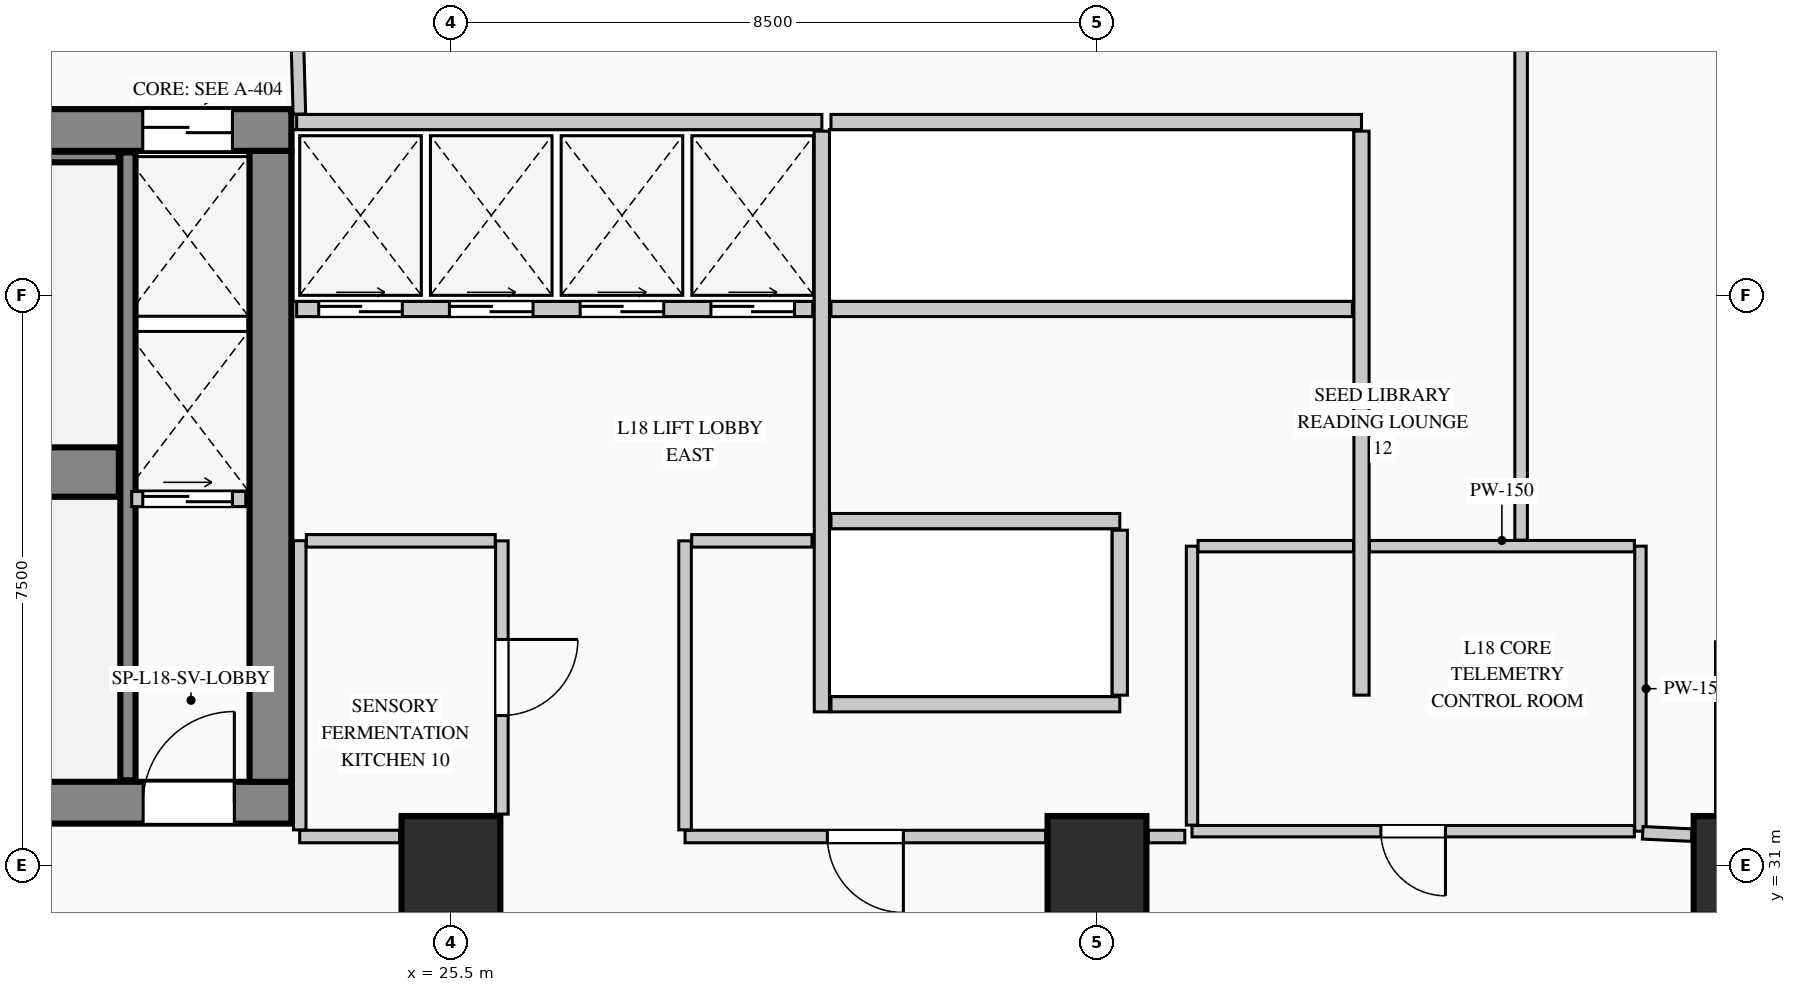
"""IFC4 building model, lengths in metres.
Left out: names, types, materials, properties, quantities, classifications, styles, units other than length and angle.
Written with IfcOpenShell. Run it as: python <this file> out.ifc"""

import sys

from ifc_helpers import new_model, si_unit, direction, frame, frame_2d, origin, origin_2d, place, context, subcontext, project, spatial, rectangle, extrude, element, fill, save


model = new_model("IFC4")
c1 = context("Model", 3, precision=1e-05, world=origin(), true_north=direction((0.0, 1.0)))
c2 = subcontext(c1, "Body", "Model", "MODEL_VIEW")
j1 = project(units=[si_unit("LENGTHUNIT", "METRE"), si_unit("PLANEANGLEUNIT", "RADIAN")], contexts=[c1])
p1 = place(None, origin())
s1 = spatial("IfcSite", under=j1, at=p1, CompositionType="ELEMENT")
p2 = place(p1, origin())
s2 = spatial("IfcBuilding", under=s1, at=p2, CompositionType="ELEMENT")
p3 = place(p2, frame((0.0, 0.0, 79.8)))
s3 = spatial("IfcBuildingStorey", under=s2, at=p3, CompositionType="ELEMENT", Elevation=79.8)
p4 = place(p3, frame((5.45, 40.675, 0.0), z_axis=(0.0, 0.0, 1.0), x_axis=(1.0, 0.0, 0.0)))
e1 = element("IfcWall", 1, at=p4, inside=s3, PredefinedType="SHEAR", context=c2, shape_type="SweptSolid", body=[
    extrude(rectangle(XDim=17.95, YDim=0.55, at=frame_2d((8.975, 0.0))), origin(), (0.0, 0.0, 1.0), 4.4),
])
p5 = place(p4, frame((15.995, 0.0, 0.0)))
e2 = element("IfcOpeningElement", 2, at=p5, cuts=e1, PredefinedType="OPENING", context=c2, shape_type="SweptSolid", body=[
    extrude(rectangle(XDim=1.18, YDim=2.25, at=frame_2d((0.59, 1.125))), frame((0.0, 0.285, 0.0), z_axis=(0.0, -1.0, 0.0), x_axis=(1.0, 0.0, 0.0)), (0.0, 0.0, 1.0), 0.57),
])
p6 = place(p3, frame((5.45, 31.825, 0.0), z_axis=(0.0, 0.0, 1.0), x_axis=(1.0, 0.0, 0.0)))
e3 = element("IfcWall", 3, at=p6, inside=s3, PredefinedType="SHEAR", context=c2, shape_type="SweptSolid", body=[
    extrude(rectangle(XDim=17.95, YDim=0.55, at=frame_2d((8.975, 0.0))), origin(), (0.0, 0.0, 1.0), 4.4),
])
p7 = place(p6, frame((3.2, 0.0, 0.0)))
e4 = element("IfcOpeningElement", 4, at=p7, cuts=e3, PredefinedType="OPENING", context=c2, shape_type="SweptSolid", body=[
    extrude(rectangle(XDim=1.2, YDim=2.2, at=frame_2d((0.6, 1.1))), frame((0.0, 0.285, 0.0), z_axis=(0.0, -1.0, 0.0), x_axis=(1.0, 0.0, 0.0)), (0.0, 0.0, 1.0), 0.57),
])
p8 = place(p6, frame((7.05, 0.0, 0.0)))
e5 = element("IfcOpeningElement", 5, at=p8, cuts=e3, PredefinedType="OPENING", context=c2, shape_type="SweptSolid", body=[
    extrude(rectangle(XDim=1.2, YDim=2.2, at=frame_2d((0.6, 1.1))), frame((0.0, 0.285, 0.0), z_axis=(0.0, -1.0, 0.0), x_axis=(1.0, 0.0, 0.0)), (0.0, 0.0, 1.0), 0.57),
])
p9 = place(p6, frame((8.9, 0.0, 0.0)))
e6 = element("IfcOpeningElement", 6, at=p9, cuts=e3, PredefinedType="OPENING", context=c2, shape_type="SweptSolid", body=[
    extrude(rectangle(XDim=1.15, YDim=2.2, at=frame_2d((0.575, 1.1))), frame((0.0, 0.285, 0.0), z_axis=(0.0, -1.0, 0.0), x_axis=(1.0, 0.0, 0.0)), (0.0, 0.0, 1.0), 0.57),
])
p10 = place(p6, frame((16.0, 0.0, 0.0)))
e7 = element("IfcOpeningElement", 7, at=p10, cuts=e3, PredefinedType="OPENING", context=c2, shape_type="SweptSolid", body=[
    extrude(rectangle(XDim=1.2, YDim=2.2, at=frame_2d((0.6, 1.1))), frame((0.0, 0.285, 0.0), z_axis=(0.0, -1.0, 0.0), x_axis=(1.0, 0.0, 0.0)), (0.0, 0.0, 1.0), 0.57),
])
p11 = place(p3, frame((23.125, 32.1, 0.0), z_axis=(0.0, 0.0, 1.0), x_axis=(0.0, 1.0, 0.0)))
e8 = element("IfcWall", 8, at=p11, inside=s3, PredefinedType="SHEAR", context=c2, shape_type="SweptSolid", body=[
    extrude(rectangle(XDim=8.3, YDim=0.55, at=frame_2d((4.15, 0.0))), origin(), (0.0, 0.0, 1.0), 4.4),
])
p12 = place(p3, frame((14.12, 36.175, 0.0), z_axis=(0.0, 0.0, 1.0), x_axis=(1.0, 0.0, 0.0)))
e9 = element("IfcWall", 9, at=p12, inside=s3, PredefinedType="SHEAR", context=c2, shape_type="SweptSolid", body=[
    extrude(rectangle(XDim=7.01, YDim=0.65, at=frame_2d((3.505, 0.0))), origin(), (0.0, 0.0, 1.0), 4.4),
])
p13 = place(p3, frame((21.25, 32.12, 0.0), z_axis=(0.0, 0.0, 1.0), x_axis=(0.0, 1.0, 0.0)))
e10 = element("IfcWall", 10, at=p13, inside=s3, PredefinedType="SHEAR", context=c2, shape_type="SweptSolid", body=[
    extrude(rectangle(XDim=8.26, YDim=0.2, at=frame_2d((4.13, 0.0))), origin(), (0.0, 0.0, 1.0), 4.4),
])
p14 = place(p3, frame((14.12, 40.32, 0.0), z_axis=(0.0, 0.0, 1.0), x_axis=(1.0, 0.0, 0.0)))
e11 = element("IfcWall", 11, at=p14, inside=s3, PredefinedType="SHEAR", context=c2, shape_type="SweptSolid", body=[
    extrude(rectangle(XDim=7.01, YDim=0.14, at=frame_2d((3.505, 0.0))), origin(), (0.0, 0.0, 1.0), 4.4),
])
for number, where, z_axis, x_axis in (
    (12, (25.5, 31.0, 0.0), (0.0, 0.0, 1.0), (1.0, 0.0, 0.0)),
    (13, (34.0, 31.0, 0.0), (0.0, 0.0, 1.0), (1.0, 0.0, 0.0)),
    (14, (42.5, 31.0, 0.0), (0.0, 0.0, 1.0), (1.0, 0.0, 0.0)),
):
    element("IfcColumn", number, at=place(p3, frame(where, z_axis=z_axis, x_axis=x_axis)), inside=s3, PredefinedType="COLUMN", context=c2, shape_type="SweptSolid", body=[
        extrude(rectangle(XDim=1.3, YDim=1.3, at=origin_2d()), origin(), (0.0, 0.0, 1.0), 4.4),
    ])
p15 = place(p3, frame((21.3, 35.82, 0.0), z_axis=(0.0, 0.0, 1.0), x_axis=(1.0, 0.0, 0.0)))
e15 = element("IfcWall", 15, at=p15, inside=s3, PredefinedType="PARTITIONING", context=c2, shape_type="SweptSolid", body=[
    extrude(rectangle(XDim=1.5, YDim=0.2, at=frame_2d((0.75, 0.0))), origin(), (0.0, 0.0, 1.0), 4.115),
])
p16 = place(p15, frame((0.145, 0.0, 0.0)))
e16 = element("IfcOpeningElement", 16, at=p16, cuts=e15, PredefinedType="OPENING", context=c2, shape_type="SweptSolid", body=[
    extrude(rectangle(XDim=1.18, YDim=2.25, at=frame_2d((0.59, 1.125))), frame((0.0, 0.11, 0.0), z_axis=(0.0, -1.0, 0.0), x_axis=(1.0, 0.0, 0.0)), (0.0, 0.0, 1.0), 0.22),
])
p17 = place(p3, frame((23.47, 40.78, 0.0), z_axis=(0.0, 0.0, 1.0), x_axis=(1.0, 0.0, 0.0)))
e17 = element("IfcWall", 17, at=p17, inside=s3, PredefinedType="PARTITIONING", context=c2, shape_type="SweptSolid", body=[
    extrude(rectangle(XDim=6.91, YDim=0.2, at=frame_2d((3.455, 0.0))), origin(), (0.0, 0.0, 1.0), 4.115),
])
p18 = place(p3, frame((30.38, 33.02, 0.0), z_axis=(0.0, 0.0, 1.0), x_axis=(0.0, 1.0, 0.0)))
e18 = element("IfcWall", 18, at=p18, inside=s3, PredefinedType="PARTITIONING", context=c2, shape_type="SweptSolid", body=[
    extrude(rectangle(XDim=7.64, YDim=0.2, at=frame_2d((3.82, 0.0))), origin(), (0.0, 0.0, 1.0), 4.115),
])
p19 = place(p3, frame((23.47, 38.32, 0.0), z_axis=(0.0, 0.0, 1.0), x_axis=(1.0, 0.0, 0.0)))
e19 = element("IfcWall", 19, at=p19, inside=s3, PredefinedType="PARTITIONING", context=c2, shape_type="SweptSolid", body=[
    extrude(rectangle(XDim=6.79, YDim=0.2, at=frame_2d((3.395, 0.0))), origin(), (0.0, 0.0, 1.0), 4.115),
])
p20 = place(p19, frame((0.29, 0.0, 0.0)))
e20 = element("IfcOpeningElement", 20, at=p20, cuts=e19, PredefinedType="OPENING", context=c2, shape_type="SweptSolid", body=[
    extrude(rectangle(XDim=1.1, YDim=2.2, at=frame_2d((0.55, 1.1))), frame((0.0, 0.11, 0.0), z_axis=(0.0, -1.0, 0.0), x_axis=(1.0, 0.0, 0.0)), (0.0, 0.0, 1.0), 0.22),
])
p21 = place(p19, frame((2.01, 0.0, 0.0)))
e21 = element("IfcOpeningElement", 21, at=p21, cuts=e19, PredefinedType="OPENING", context=c2, shape_type="SweptSolid", body=[
    extrude(rectangle(XDim=1.1, YDim=2.2, at=frame_2d((0.55, 1.1))), frame((0.0, 0.11, 0.0), z_axis=(0.0, -1.0, 0.0), x_axis=(1.0, 0.0, 0.0)), (0.0, 0.0, 1.0), 0.22),
])
p22 = place(p19, frame((3.73, 0.0, 0.0)))
e22 = element("IfcOpeningElement", 22, at=p22, cuts=e19, PredefinedType="OPENING", context=c2, shape_type="SweptSolid", body=[
    extrude(rectangle(XDim=1.1, YDim=2.2, at=frame_2d((0.55, 1.1))), frame((0.0, 0.11, 0.0), z_axis=(0.0, -1.0, 0.0), x_axis=(1.0, 0.0, 0.0)), (0.0, 0.0, 1.0), 0.22),
])
p23 = place(p19, frame((5.45, 0.0, 0.0)))
e23 = element("IfcOpeningElement", 23, at=p23, cuts=e19, PredefinedType="OPENING", context=c2, shape_type="SweptSolid", body=[
    extrude(rectangle(XDim=1.1, YDim=2.2, at=frame_2d((0.55, 1.1))), frame((0.0, 0.11, 0.0), z_axis=(0.0, -1.0, 0.0), x_axis=(1.0, 0.0, 0.0)), (0.0, 0.0, 1.0), 0.22),
])
p24 = place(p3, frame((30.5, 40.78, 0.0), z_axis=(0.0, 0.0, 1.0), x_axis=(1.0, 0.0, 0.0)))
e24 = element("IfcWall", 24, at=p24, inside=s3, PredefinedType="PARTITIONING", context=c2, shape_type="SweptSolid", body=[
    extrude(rectangle(XDim=6.98, YDim=0.2, at=frame_2d((3.49, 0.0))), origin(), (0.0, 0.0, 1.0), 4.115),
])
p25 = place(p3, frame((37.48, 33.24, 0.0), z_axis=(0.0, 0.0, 1.0), x_axis=(0.0, 1.0, 0.0)))
e25 = element("IfcWall", 25, at=p25, inside=s3, PredefinedType="PARTITIONING", context=c2, shape_type="SweptSolid", body=[
    extrude(rectangle(XDim=7.42, YDim=0.2, at=frame_2d((3.71, 0.0))), origin(), (0.0, 0.0, 1.0), 4.115),
])
p26 = place(p3, frame((30.5, 38.32, 0.0), z_axis=(0.0, 0.0, 1.0), x_axis=(1.0, 0.0, 0.0)))
e26 = element("IfcWall", 26, at=p26, inside=s3, PredefinedType="PARTITIONING", context=c2, shape_type="SweptSolid", body=[
    extrude(rectangle(XDim=6.86, YDim=0.2, at=frame_2d((3.43, 0.0))), origin(), (0.0, 0.0, 1.0), 4.115),
])
for number, where, z_axis, x_axis in (
    (27, (30.5, 35.53, 0.0), (0.0, 0.0, 1.0), (1.0, 0.0, 0.0)),
    (28, (30.5, 33.12, 0.0), (0.0, 0.0, 1.0), (1.0, 0.0, 0.0)),
):
    element("IfcWall", number, at=place(p3, frame(where, z_axis=z_axis, x_axis=x_axis)), inside=s3, PredefinedType="PARTITIONING", context=c2, shape_type="SweptSolid", body=[
        extrude(rectangle(XDim=3.8, YDim=0.2, at=frame_2d((1.9, 0.0))), origin(), (0.0, 0.0, 1.0), 4.115),
    ])
p27 = place(p3, frame((34.3, 33.24, 0.0), z_axis=(0.0, 0.0, 1.0), x_axis=(0.0, 1.0, 0.0)))
e29 = element("IfcWall", 29, at=p27, inside=s3, PredefinedType="PARTITIONING", context=c2, shape_type="SweptSolid", body=[
    extrude(rectangle(XDim=2.17, YDim=0.2, at=frame_2d((1.085, 0.0))), origin(), (0.0, 0.0, 1.0), 4.115),
])
p28 = place(p3, frame((41.15, 35.2, 0.0), z_axis=(0.0, 0.0, 1.0), x_axis=(0.0, -1.0, 0.0)))
e30 = element("IfcWall", 30, at=p28, inside=s3, PredefinedType="PARTITIONING", context=c2, shape_type="SweptSolid", body=[
    extrude(rectangle(XDim=3.75, YDim=0.15, at=frame_2d((1.875, 0.0))), origin(), (0.0, 0.0, 1.0), 4.115),
])
p29 = place(p3, frame((41.07, 31.45, 0.0), z_axis=(0.0, 0.0, 1.0), x_axis=(-1.0, 0.0, 0.0)))
e31 = element("IfcWall", 31, at=p29, inside=s3, PredefinedType="PARTITIONING", context=c2, shape_type="SweptSolid", body=[
    extrude(rectangle(XDim=5.82, YDim=0.15, at=frame_2d((2.91, 0.0))), origin(), (0.0, 0.0, 1.0), 4.115),
])
p30 = place(p29, frame((2.485, 0.0, 0.0)))
e32 = element("IfcOpeningElement", 32, at=p30, cuts=e31, PredefinedType="OPENING", context=c2, shape_type="SweptSolid", body=[
    extrude(rectangle(XDim=0.85, YDim=2.1, at=frame_2d((0.425, 1.05))), frame((0.0, 0.085, 0.0), z_axis=(0.0, -1.0, 0.0), x_axis=(1.0, 0.0, 0.0)), (0.0, 0.0, 1.0), 0.17),
])
p31 = place(p3, frame((35.25, 31.53, 0.0), z_axis=(0.0, 0.0, 1.0), x_axis=(0.0, 1.0, 0.0)))
e33 = element("IfcWall", 33, at=p31, inside=s3, PredefinedType="PARTITIONING", context=c2, shape_type="SweptSolid", body=[
    extrude(rectangle(XDim=3.67, YDim=0.15, at=frame_2d((1.835, 0.0))), origin(), (0.0, 0.0, 1.0), 4.115),
])
p32 = place(p3, frame((35.33, 35.2, 0.0), z_axis=(0.0, 0.0, 1.0), x_axis=(1.0, 0.0, 0.0)))
e34 = element("IfcWall", 34, at=p32, inside=s3, PredefinedType="PARTITIONING", context=c2, shape_type="SweptSolid", body=[
    extrude(rectangle(XDim=2.045, YDim=0.15, at=frame_2d((1.022, 0.0))), origin(), (0.0, 0.0, 1.0), 4.115),
])
p33 = place(p3, frame((37.585, 35.2, 0.0), z_axis=(0.0, 0.0, 1.0), x_axis=(1.0, 0.0, 0.0)))
e35 = element("IfcWall", 35, at=p33, inside=s3, PredefinedType="PARTITIONING", context=c2, shape_type="SweptSolid", body=[
    extrude(rectangle(XDim=3.485, YDim=0.15, at=frame_2d((1.743, 0.0))), origin(), (0.0, 0.0, 1.0), 4.115),
])
p34 = place(p3, frame((26.17, 35.27, 0.0), z_axis=(0.0, 0.0, 1.0), x_axis=(0.0, -1.0, 0.0)))
e36 = element("IfcWall", 36, at=p34, inside=s3, PredefinedType="PARTITIONING", context=c2, shape_type="SweptSolid", body=[
    extrude(rectangle(XDim=3.595, YDim=0.165, at=frame_2d((1.797, 0.0))), origin(), (0.0, 0.0, 1.0), 4.115),
])
p35 = place(p34, frame((1.298, 0.0, 0.0)))
e37 = element("IfcOpeningElement", 37, at=p35, cuts=e36, PredefinedType="OPENING", context=c2, shape_type="SweptSolid", body=[
    extrude(rectangle(XDim=1.0, YDim=2.15, at=frame_2d((0.5, 1.075))), frame((0.0, 0.093, 0.0), z_axis=(0.0, -1.0, 0.0), x_axis=(1.0, 0.0, 0.0)), (0.0, 0.0, 1.0), 0.185),
])
p36 = place(p3, frame((24.825, 31.38, 0.0), z_axis=(0.0, 0.0, 1.0), x_axis=(-1.0, 0.0, 0.0)))
e38 = element("IfcWall", 38, at=p36, inside=s3, PredefinedType="PARTITIONING", context=c2, shape_type="SweptSolid", body=[
    extrude(rectangle(XDim=1.315, YDim=0.165, at=frame_2d((0.657, 0.0))), origin(), (0.0, 0.0, 1.0), 4.115),
])
p37 = place(p3, frame((23.51, 31.468, 0.0), z_axis=(0.0, 0.0, 1.0), x_axis=(0.0, 1.0, 0.0)))
e39 = element("IfcWall", 39, at=p37, inside=s3, PredefinedType="PARTITIONING", context=c2, shape_type="SweptSolid", body=[
    extrude(rectangle(XDim=3.804, YDim=0.165, at=frame_2d((1.902, 0.0))), origin(), (0.0, 0.0, 1.0), 4.115),
])
p38 = place(p3, frame((23.597, 35.27, 0.0), z_axis=(0.0, 0.0, 1.0), x_axis=(1.0, 0.0, 0.0)))
e40 = element("IfcWall", 40, at=p38, inside=s3, PredefinedType="PARTITIONING", context=c2, shape_type="SweptSolid", body=[
    extrude(rectangle(XDim=2.485, YDim=0.165, at=frame_2d((1.243, 0.0))), origin(), (0.0, 0.0, 1.0), 4.115),
])
p39 = place(p3, frame((39.58, 35.28, 0.0), z_axis=(0.0, 0.0, 1.0), x_axis=(0.0, 1.0, 0.0)))
e41 = element("IfcWall", 41, at=p39, inside=s3, PredefinedType="PARTITIONING", context=c2, shape_type="SweptSolid", body=[
    extrude(rectangle(XDim=7.935, YDim=0.165, at=frame_2d((3.968, 0.0))), origin(), (0.0, 0.0, 1.0), 4.115),
])
p40 = place(p3, frame((42.22, 33.942, 0.0), z_axis=(0.0, 0.0, 1.0), x_axis=(0.0, -1.0, 0.0)))
e42 = element("IfcWall", 42, at=p40, inside=s3, PredefinedType="PARTITIONING", context=c2, shape_type="SweptSolid", body=[
    extrude(rectangle(XDim=2.267, YDim=0.165, at=frame_2d((1.134, 0.0))), origin(), (0.0, 0.0, 1.0), 4.115),
])
p41 = place(p3, frame((41.825, 31.398, 0.0), z_axis=(0.0, 0.0, 1.0), x_axis=(-0.998882632516, 0.04725977633, 0.0)))
e43 = element("IfcWall", 43, at=p41, inside=s3, PredefinedType="PARTITIONING", context=c2, shape_type="SweptSolid", body=[
    extrude(rectangle(XDim=0.646, YDim=0.165, at=frame_2d((0.323, 0.0))), origin(), (0.0, 0.0, 1.0), 4.115),
])
p42 = place(p3, frame((35.156, 31.38, 0.0), z_axis=(0.0, 0.0, 1.0), x_axis=(-1.0, 0.0, 0.0)))
e44 = element("IfcWall", 44, at=p42, inside=s3, PredefinedType="PARTITIONING", context=c2, shape_type="SweptSolid", body=[
    extrude(rectangle(XDim=0.48, YDim=0.165, at=frame_2d((0.24, 0.0))), origin(), (0.0, 0.0, 1.0), 4.115),
])
p43 = place(p3, frame((33.325, 31.38, 0.0), z_axis=(0.0, 0.0, 1.0), x_axis=(-1.0, 0.0, 0.0)))
e45 = element("IfcWall", 45, at=p43, inside=s3, PredefinedType="PARTITIONING", context=c2, shape_type="SweptSolid", body=[
    extrude(rectangle(XDim=4.745, YDim=0.165, at=frame_2d((2.373, 0.0))), origin(), (0.0, 0.0, 1.0), 4.115),
])
p44 = place(p43, frame((1.873, 0.0, 0.0)))
e46 = element("IfcOpeningElement", 46, at=p44, cuts=e45, PredefinedType="OPENING", context=c2, shape_type="SweptSolid", body=[
    extrude(rectangle(XDim=1.0, YDim=2.15, at=frame_2d((0.5, 1.075))), frame((0.0, 0.093, 0.0), z_axis=(0.0, -1.0, 0.0), x_axis=(1.0, 0.0, 0.0)), (0.0, 0.0, 1.0), 0.185),
])
p45 = place(p3, frame((28.58, 31.468, 0.0), z_axis=(0.0, 0.0, 1.0), x_axis=(0.0, 1.0, 0.0)))
e47 = element("IfcWall", 47, at=p45, inside=s3, PredefinedType="PARTITIONING", context=c2, shape_type="SweptSolid", body=[
    extrude(rectangle(XDim=3.802, YDim=0.165, at=frame_2d((1.901, 0.0))), origin(), (0.0, 0.0, 1.0), 4.115),
])
p46 = place(p3, frame((28.667, 35.27, 0.0), z_axis=(0.0, 0.0, 1.0), x_axis=(1.0, 0.0, 0.0)))
e48 = element("IfcWall", 48, at=p46, inside=s3, PredefinedType="PARTITIONING", context=c2, shape_type="SweptSolid", body=[
    extrude(rectangle(XDim=1.583, YDim=0.165, at=frame_2d((0.791, 0.0))), origin(), (0.0, 0.0, 1.0), 4.115),
])
p47 = place(p3, frame((23.506, 40.885, 0.0), z_axis=(0.0, 0.0, 1.0), x_axis=(-0.027441464163, 0.999623412113, 0.0)))
e49 = element("IfcWall", 49, at=p47, inside=s3, PredefinedType="PARTITIONING", context=c2, shape_type="SweptSolid", body=[
    extrude(rectangle(XDim=2.331, YDim=0.165, at=frame_2d((1.166, 0.0))), origin(), (0.0, 0.0, 1.0), 4.115),
])
p48 = place(p10, origin())
e50 = element("IfcDoor", 50, at=p48, inside=s3, OperationType="SINGLE_SWING_RIGHT", PredefinedType="DOOR", context=c2, shape_type="SweptSolid", body=[
    extrude(rectangle(XDim=1.2, YDim=2.2, at=frame_2d((0.6, 1.1))), frame((0.0, 0.025, 0.0), z_axis=(0.0, -1.0, 0.0), x_axis=(1.0, 0.0, 0.0)), (0.0, 0.0, 1.0), 0.05),
])
fill(e7, e50)
p49 = place(p5, origin())
e51 = element("IfcDoor", 51, at=p49, inside=s3, OperationType="DOUBLE_DOOR_SLIDING", PredefinedType="DOOR", context=c2, shape_type="SweptSolid", body=[
    extrude(rectangle(XDim=1.18, YDim=2.25, at=frame_2d((0.59, 1.125))), frame((0.0, 0.025, 0.0), z_axis=(0.0, -1.0, 0.0), x_axis=(1.0, 0.0, 0.0)), (0.0, 0.0, 1.0), 0.05),
])
fill(e2, e51)
p50 = place(p16, origin())
e52 = element("IfcDoor", 52, at=p50, inside=s3, OperationType="DOUBLE_DOOR_SLIDING", PredefinedType="DOOR", context=c2, shape_type="SweptSolid", body=[
    extrude(rectangle(XDim=1.18, YDim=2.25, at=frame_2d((0.59, 1.125))), frame((0.0, 0.025, 0.0), z_axis=(0.0, -1.0, 0.0), x_axis=(1.0, 0.0, 0.0)), (0.0, 0.0, 1.0), 0.05),
])
fill(e16, e52)
p51 = place(p20, origin())
e53 = element("IfcDoor", 53, at=p51, inside=s3, OperationType="DOUBLE_DOOR_SLIDING", PredefinedType="DOOR", context=c2, shape_type="SweptSolid", body=[
    extrude(rectangle(XDim=1.1, YDim=2.2, at=frame_2d((0.55, 1.1))), frame((0.0, 0.025, 0.0), z_axis=(0.0, -1.0, 0.0), x_axis=(1.0, 0.0, 0.0)), (0.0, 0.0, 1.0), 0.05),
])
fill(e20, e53)
p52 = place(p21, origin())
e54 = element("IfcDoor", 54, at=p52, inside=s3, OperationType="DOUBLE_DOOR_SLIDING", PredefinedType="DOOR", context=c2, shape_type="SweptSolid", body=[
    extrude(rectangle(XDim=1.1, YDim=2.2, at=frame_2d((0.55, 1.1))), frame((0.0, 0.025, 0.0), z_axis=(0.0, -1.0, 0.0), x_axis=(1.0, 0.0, 0.0)), (0.0, 0.0, 1.0), 0.05),
])
fill(e21, e54)
p53 = place(p22, origin())
e55 = element("IfcDoor", 55, at=p53, inside=s3, OperationType="DOUBLE_DOOR_SLIDING", PredefinedType="DOOR", context=c2, shape_type="SweptSolid", body=[
    extrude(rectangle(XDim=1.1, YDim=2.2, at=frame_2d((0.55, 1.1))), frame((0.0, 0.025, 0.0), z_axis=(0.0, -1.0, 0.0), x_axis=(1.0, 0.0, 0.0)), (0.0, 0.0, 1.0), 0.05),
])
fill(e22, e55)
p54 = place(p23, origin())
e56 = element("IfcDoor", 56, at=p54, inside=s3, OperationType="DOUBLE_DOOR_SLIDING", PredefinedType="DOOR", context=c2, shape_type="SweptSolid", body=[
    extrude(rectangle(XDim=1.1, YDim=2.2, at=frame_2d((0.55, 1.1))), frame((0.0, 0.025, 0.0), z_axis=(0.0, -1.0, 0.0), x_axis=(1.0, 0.0, 0.0)), (0.0, 0.0, 1.0), 0.05),
])
fill(e23, e56)
p55 = place(p30, origin())
e57 = element("IfcDoor", 57, at=p55, inside=s3, OperationType="SINGLE_SWING_LEFT", PredefinedType="DOOR", context=c2, shape_type="SweptSolid", body=[
    extrude(rectangle(XDim=0.85, YDim=2.1, at=frame_2d((0.425, 1.05))), frame((0.0, 0.025, 0.0), z_axis=(0.0, -1.0, 0.0), x_axis=(1.0, 0.0, 0.0)), (0.0, 0.0, 1.0), 0.05),
])
fill(e32, e57)
p56 = place(p35, origin())
e58 = element("IfcDoor", 58, at=p56, inside=s3, OperationType="SINGLE_SWING_LEFT", PredefinedType="DOOR", context=c2, shape_type="SweptSolid", body=[
    extrude(rectangle(XDim=1.0, YDim=2.15, at=frame_2d((0.5, 1.075))), frame((0.0, 0.025, 0.0), z_axis=(0.0, -1.0, 0.0), x_axis=(1.0, 0.0, 0.0)), (0.0, 0.0, 1.0), 0.05),
])
fill(e37, e58)
p57 = place(p44, origin())
e59 = element("IfcDoor", 59, at=p57, inside=s3, OperationType="SINGLE_SWING_LEFT", PredefinedType="DOOR", context=c2, shape_type="SweptSolid", body=[
    extrude(rectangle(XDim=1.0, YDim=2.15, at=frame_2d((0.5, 1.075))), frame((0.0, 0.025, 0.0), z_axis=(0.0, -1.0, 0.0), x_axis=(1.0, 0.0, 0.0)), (0.0, 0.0, 1.0), 0.05),
])
fill(e46, e59)
save(model, sys.argv[1])
